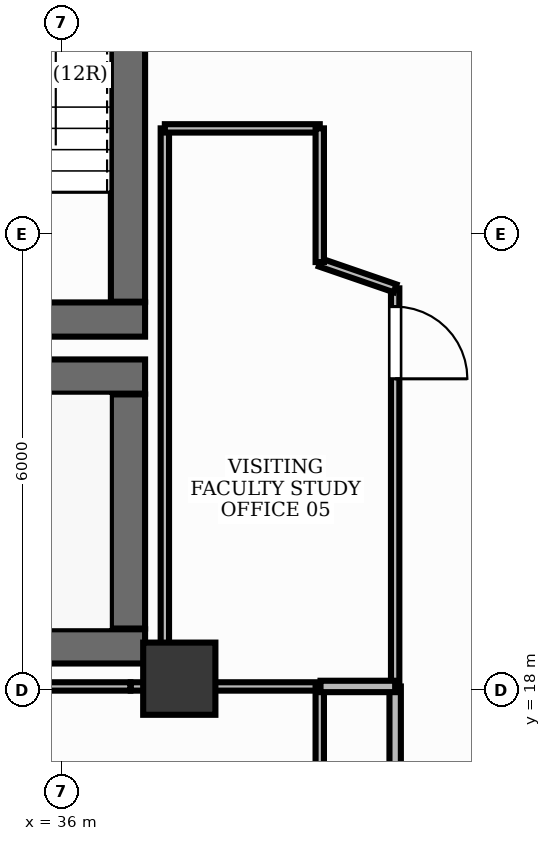
"""IFC4 building model, lengths in metres.
Left out: names, types, materials, properties, quantities, classifications, styles, units other than length and angle.
Written with IfcOpenShell. Run it as: python <this file> out.ifc"""

import sys

from ifc_helpers import new_model, si_unit, direction, frame, frame_2d, origin, origin_2d, place, context, subcontext, project, spatial, rectangle, extrude, element, fill, save


model = new_model("IFC4")
c1 = context("Model", 3, precision=1e-05, world=origin(), true_north=direction((0.0, 1.0)))
c2 = subcontext(c1, "Body", "Model", "MODEL_VIEW")
j1 = project(units=[si_unit("LENGTHUNIT", "METRE"), si_unit("PLANEANGLEUNIT", "RADIAN")], contexts=[c1])
p1 = place(None, origin())
s1 = spatial("IfcSite", under=j1, at=p1, CompositionType="ELEMENT")
p2 = place(p1, origin())
s2 = spatial("IfcBuilding", under=s1, at=p2, CompositionType="ELEMENT")
p3 = place(p2, frame((0.0, 0.0, 127.8)))
s3 = spatial("IfcBuildingStorey", under=s2, at=p3, CompositionType="ELEMENT", Elevation=127.8)
p4 = place(p3, frame((28.852, 18.575, 0.0), z_axis=(0.0, 0.0, 1.0), x_axis=(1.0, 0.0, 0.0)))
e1 = element("IfcWall", 1, at=p4, inside=s3, PredefinedType="SHEAR", context=c2, shape_type="SweptSolid", body=[
    extrude(rectangle(XDim=8.248, YDim=0.45, at=frame_2d((4.124, 0.0))), origin(), (0.0, 0.0, 1.0), 3.9),
])
p5 = place(p3, frame((28.35, 22.125, 0.0), z_axis=(0.0, 0.0, 1.0), x_axis=(1.0, 0.0, 0.0)))
e2 = element("IfcWall", 2, at=p5, inside=s3, PredefinedType="SHEAR", context=c2, shape_type="SweptSolid", body=[
    extrude(rectangle(XDim=8.75, YDim=0.45, at=frame_2d((4.375, 0.0))), origin(), (0.0, 0.0, 1.0), 3.9),
])
p6 = place(p3, frame((36.875, 18.81, 0.0), z_axis=(0.0, 0.0, 1.0), x_axis=(0.0, 1.0, 0.0)))
e3 = element("IfcWall", 3, at=p6, inside=s3, PredefinedType="SHEAR", context=c2, shape_type="SweptSolid", body=[
    extrude(rectangle(XDim=3.08, YDim=0.45, at=frame_2d((1.54, 0.0))), origin(), (0.0, 0.0, 1.0), 3.9),
])
p7 = place(p3, frame((33.1, 22.875, 0.0), z_axis=(0.0, 0.0, 1.0), x_axis=(1.0, 0.0, 0.0)))
e4 = element("IfcWall", 4, at=p7, inside=s3, PredefinedType="SHEAR", context=c2, shape_type="SweptSolid", body=[
    extrude(rectangle(XDim=4.0, YDim=0.45, at=frame_2d((2.0, 0.0))), origin(), (0.0, 0.0, 1.0), 3.9),
])
p8 = place(p3, frame((36.875, 23.11, 0.0), z_axis=(0.0, 0.0, 1.0), x_axis=(0.0, 1.0, 0.0)))
e5 = element("IfcWall", 5, at=p8, inside=s3, PredefinedType="SHEAR", context=c2, shape_type="SweptSolid", body=[
    extrude(rectangle(XDim=7.78, YDim=0.45, at=frame_2d((3.89, 0.0))), origin(), (0.0, 0.0, 1.0), 3.9),
])
p9 = place(p3, frame((37.55, 18.15, -0.0), z_axis=(0.0, 0.0, 1.0), x_axis=(1.0, 0.0, 0.0)))
e6 = element("IfcColumn", 6, at=p9, inside=s3, PredefinedType="PILASTER", context=c2, shape_type="SweptSolid", body=[
    extrude(rectangle(XDim=0.95, YDim=0.95, at=origin_2d()), origin(), (0.0, 0.0, 1.0), 3.901),
])
p10 = place(p3, frame((40.39, 23.285, 0.0), z_axis=(0.0, 0.0, 1.0), x_axis=(0.0, -1.0, 0.0)))
e7 = element("IfcWall", 7, at=p10, inside=s3, PredefinedType="MOVABLE", context=c2, shape_type="SweptSolid", body=[
    extrude(rectangle(XDim=5.227, YDim=0.11, at=frame_2d((2.614, 0.0))), origin(), (0.0, 0.0, 1.0), 2.91),
])
p11 = place(p10, frame((0.24, 0.0, 0.0)))
e8 = element("IfcOpeningElement", 8, at=p11, cuts=e7, PredefinedType="OPENING", context=c2, shape_type="SweptSolid", body=[
    extrude(rectangle(XDim=0.95, YDim=2.15, at=frame_2d((0.475, 1.075))), frame((0.0, 0.07, 0.0), z_axis=(0.0, -1.0, 0.0), x_axis=(1.0, 0.0, 0.0)), (0.0, 0.0, 1.0), 0.14),
])
p12 = place(p3, frame((36.912, 18.048, 0.0), z_axis=(0.0, 0.0, 1.0), x_axis=(1.0, 0.0, 0.0)))
e9 = element("IfcWall", 9, at=p12, inside=s3, PredefinedType="MOVABLE", context=c2, shape_type="SweptSolid", body=[
    extrude(rectangle(XDim=2.486, YDim=0.11, at=frame_2d((1.243, 0.0))), origin(), (0.0, 0.0, 1.0), 2.91),
])
p13 = place(p3, frame((39.398, 18.048, 0.0), z_axis=(0.0, 0.0, 1.0), x_axis=(0.0, -1.0, 0.0)))
e10 = element("IfcWall", 10, at=p13, inside=s3, PredefinedType="MOVABLE", context=c2, shape_type="SweptSolid", body=[
    extrude(rectangle(XDim=3.049, YDim=0.11, at=frame_2d((1.524, 0.0))), origin(), (0.0, 0.0, 1.0), 2.91),
])
p14 = place(p3, frame((33.46, 18.048, 0.0), z_axis=(0.0, 0.0, 1.0), x_axis=(1.0, 0.0, 0.0)))
e11 = element("IfcWall", 11, at=p14, inside=s3, PredefinedType="MOVABLE", context=c2, shape_type="SweptSolid", body=[
    extrude(rectangle(XDim=3.446, YDim=0.11, at=frame_2d((1.723, 0.0))), origin(), (0.0, 0.0, 1.0), 2.91),
])
p15 = place(p3, frame((40.39, 18.048, 0.0), z_axis=(0.0, 0.0, 1.0), x_axis=(0.0, -1.0, 0.0)))
e12 = element("IfcWall", 12, at=p15, inside=s3, PredefinedType="PARTITIONING", context=c2, shape_type="SweptSolid", body=[
    extrude(rectangle(XDim=1.548, YDim=0.15, at=frame_2d((0.774, 0.0))), origin(), (0.0, 0.0, 1.0), 2.91),
])
p16 = place(p3, frame((39.408, 18.048, 0.0), z_axis=(0.0, 0.0, 1.0), x_axis=(1.0, 0.0, 0.0)))
e13 = element("IfcWall", 13, at=p16, inside=s3, PredefinedType="PARTITIONING", context=c2, shape_type="SweptSolid", body=[
    extrude(rectangle(XDim=0.982, YDim=0.15, at=frame_2d((0.491, 0.0))), origin(), (0.0, 0.0, 1.0), 2.91),
])
p17 = place(p3, frame((39.402, 23.625, 0.0), z_axis=(0.0, 0.0, 1.0), x_axis=(0.945457381587, -0.325745820547, 0.0)))
e14 = element("IfcWall", 14, at=p17, inside=s3, PredefinedType="MOVABLE", context=c2, shape_type="SweptSolid", body=[
    extrude(rectangle(XDim=1.045, YDim=0.11, at=frame_2d((0.522, 0.0))), origin(), (0.0, 0.0, 1.0), 2.91),
])
p18 = place(p3, frame((37.36, 18.1, 0.0), z_axis=(0.0, 0.0, 1.0), x_axis=(0.0, 1.0, 0.0)))
e15 = element("IfcWall", 15, at=p18, inside=s3, PredefinedType="MOVABLE", context=c2, shape_type="SweptSolid", body=[
    extrude(rectangle(XDim=7.29, YDim=0.11, at=frame_2d((3.645, 0.0))), origin(), (0.0, 0.0, 1.0), 2.91),
])
p19 = place(p3, frame((37.36, 25.39, 0.0), z_axis=(0.0, 0.0, 1.0), x_axis=(1.0, 0.0, 0.0)))
e16 = element("IfcWall", 16, at=p19, inside=s3, PredefinedType="MOVABLE", context=c2, shape_type="SweptSolid", body=[
    extrude(rectangle(XDim=2.038, YDim=0.11, at=frame_2d((1.019, 0.0))), origin(), (0.0, 0.0, 1.0), 2.91),
])
p20 = place(p3, frame((39.398, 25.39, 0.0), z_axis=(0.0, 0.0, 1.0), x_axis=(0.0, -1.0, 0.0)))
e17 = element("IfcWall", 17, at=p20, inside=s3, PredefinedType="MOVABLE", context=c2, shape_type="SweptSolid", body=[
    extrude(rectangle(XDim=1.759, YDim=0.11, at=frame_2d((0.879, 0.0))), origin(), (0.0, 0.0, 1.0), 2.91),
])
p21 = place(p11, origin())
e18 = element("IfcDoor", 18, at=p21, inside=s3, OperationType="SINGLE_SWING_RIGHT", PredefinedType="DOOR", context=c2, shape_type="SweptSolid", body=[
    extrude(rectangle(XDim=0.95, YDim=2.15, at=frame_2d((0.475, 1.075))), frame((0.0, 0.025, 0.0), z_axis=(0.0, -1.0, 0.0), x_axis=(1.0, 0.0, 0.0)), (0.0, 0.0, 1.0), 0.05),
])
fill(e8, e18)
save(model, sys.argv[1])
